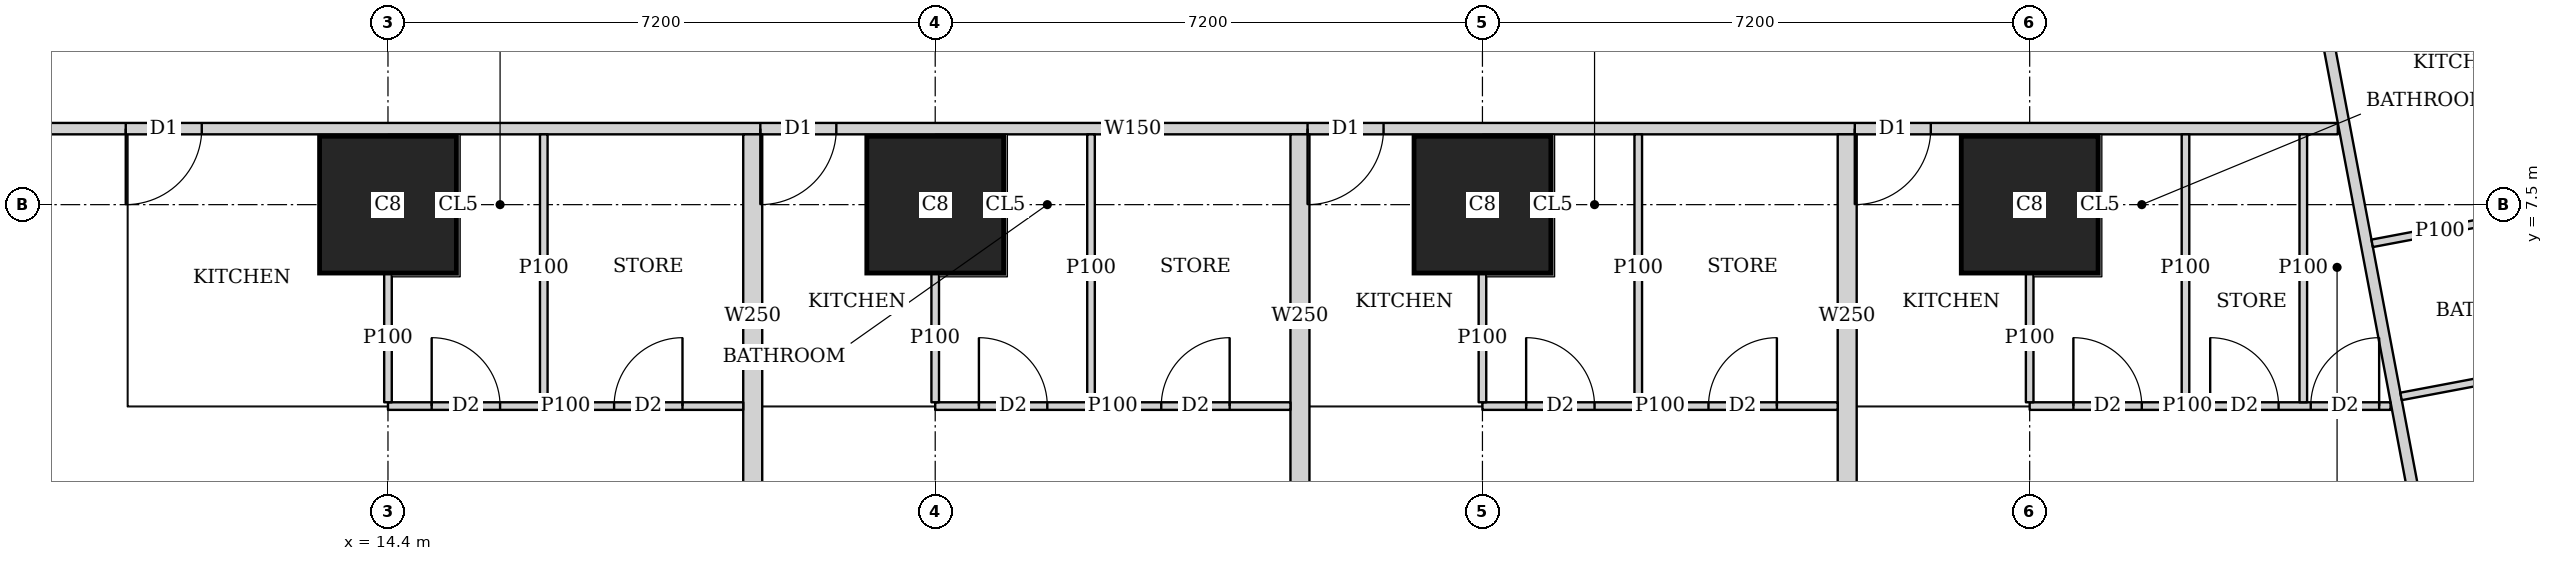
"""IFC4 building model, lengths in metres.
Left out: names, types, materials, properties, quantities, classifications, styles, units other than length and angle.
Written with IfcOpenShell. Run it as: python <this file> out.ifc"""

import sys

from ifc_helpers import new_model, si_unit, direction, frame, frame_2d, origin, origin_2d, place, context, subcontext, project, spatial, rectangle, extrude, element, fill, save


model = new_model("IFC4")
c1 = context("Model", 3, precision=1e-05, world=origin(), true_north=direction((0.0, 1.0)))
c2 = subcontext(c1, "Body", "Model", "MODEL_VIEW")
j1 = project(units=[si_unit("LENGTHUNIT", "METRE"), si_unit("PLANEANGLEUNIT", "RADIAN")], contexts=[c1])
p1 = place(None, origin())
s1 = spatial("IfcSite", under=j1, at=p1, CompositionType="ELEMENT")
p2 = place(p1, origin())
s2 = spatial("IfcBuilding", under=s1, at=p2, CompositionType="ELEMENT")
p3 = place(p2, frame((0.0, 0.0, 68.75)))
s3 = spatial("IfcBuildingStorey", under=s2, at=p3, CompositionType="ELEMENT", Elevation=68.75)
for number, where, z_axis, x_axis in (
    (1, (14.4, 7.5, 0.0), (0.0, 0.0, 1.0), (1.0, 0.0, 0.0)),
    (2, (21.6, 7.5, 0.0), (0.0, 0.0, 1.0), (1.0, 0.0, 0.0)),
    (3, (28.8, 7.5, 0.0), (0.0, 0.0, 1.0), (1.0, 0.0, 0.0)),
    (4, (36.0, 7.5, 0.0), (0.0, 0.0, 1.0), (1.0, 0.0, 0.0)),
):
    element("IfcColumn", number, at=place(p3, frame(where, z_axis=z_axis, x_axis=x_axis)), inside=s3, PredefinedType="COLUMN", context=c2, shape_type="SweptSolid", body=[
        extrude(rectangle(XDim=1.8, YDim=1.8, at=origin_2d()), origin(), (0.0, 0.0, 1.0), 3.75),
    ])
p4 = place(p3, frame((40.054, 8.5, 0.0), z_axis=(0.0, 0.0, 1.0), x_axis=(-1.0, 0.0, 0.0)))
e5 = element("IfcWall", 5, at=p4, inside=s3, PredefinedType="SOLIDWALL", context=c2, shape_type="SweptSolid", body=[
    extrude(rectangle(XDim=31.704, YDim=0.15, at=frame_2d((15.852, 0.0))), origin(), (0.0, 0.0, 1.0), 3.45),
])
p5 = place(p4, frame((28.104, 0.0, 0.0)))
e6 = element("IfcOpeningElement", 6, at=p5, cuts=e5, PredefinedType="OPENING", context=c2, shape_type="SweptSolid", body=[
    extrude(rectangle(XDim=1.0, YDim=2.1, at=frame_2d((0.5, 1.05))), frame((0.0, 0.085, 0.0), z_axis=(0.0, -1.0, 0.0), x_axis=(1.0, 0.0, 0.0)), (0.0, 0.0, 1.0), 0.17),
])
p6 = place(p4, frame((19.755, 0.0, 0.0)))
e7 = element("IfcOpeningElement", 7, at=p6, cuts=e5, PredefinedType="OPENING", context=c2, shape_type="SweptSolid", body=[
    extrude(rectangle(XDim=1.0, YDim=2.1, at=frame_2d((0.5, 1.05))), frame((0.0, 0.085, 0.0), z_axis=(0.0, -1.0, 0.0), x_axis=(1.0, 0.0, 0.0)), (0.0, 0.0, 1.0), 0.17),
])
p7 = place(p4, frame((12.555, 0.0, 0.0)))
e8 = element("IfcOpeningElement", 8, at=p7, cuts=e5, PredefinedType="OPENING", context=c2, shape_type="SweptSolid", body=[
    extrude(rectangle(XDim=1.0, YDim=2.1, at=frame_2d((0.5, 1.05))), frame((0.0, 0.085, 0.0), z_axis=(0.0, -1.0, 0.0), x_axis=(1.0, 0.0, 0.0)), (0.0, 0.0, 1.0), 0.17),
])
p8 = place(p4, frame((5.355, 0.0, 0.0)))
e9 = element("IfcOpeningElement", 9, at=p8, cuts=e5, PredefinedType="OPENING", context=c2, shape_type="SweptSolid", body=[
    extrude(rectangle(XDim=1.0, YDim=2.1, at=frame_2d((0.5, 1.05))), frame((0.0, 0.085, 0.0), z_axis=(0.0, -1.0, 0.0), x_axis=(1.0, 0.0, 0.0)), (0.0, 0.0, 1.0), 0.17),
])
p9 = place(p3, frame((33.68, 42.723, 0.0), z_axis=(0.0, 0.0, 1.0), x_axis=(0.185624129307, -0.98262082342, 0.0)))
e10 = element("IfcWall", 10, at=p9, inside=s3, PredefinedType="SOLIDWALL", context=c2, shape_type="SweptSolid", body=[
    extrude(rectangle(XDim=41.051, YDim=0.15, at=frame_2d((20.526, 0.0))), origin(), (0.0, 0.0, 1.0), 2.45),
])
p10 = place(p9, frame((13.577, 0.0, 0.0)))
e11 = element("IfcOpeningElement", 11, at=p10, cuts=e10, PredefinedType="OPENING", context=c2, shape_type="SweptSolid", body=[
    extrude(rectangle(XDim=1.0, YDim=2.1, at=frame_2d((0.5, 1.05))), frame((0.0, 0.085, 0.0), z_axis=(0.0, -1.0, 0.0), x_axis=(1.0, 0.0, 0.0)), (0.0, 0.0, 1.0), 0.17),
])
p11 = place(p9, frame((17.394, 0.0, 0.0)))
e12 = element("IfcOpeningElement", 12, at=p11, cuts=e10, PredefinedType="OPENING", context=c2, shape_type="SweptSolid", body=[
    extrude(rectangle(XDim=1.0, YDim=2.1, at=frame_2d((0.5, 1.05))), frame((0.0, 0.085, 0.0), z_axis=(0.0, -1.0, 0.0), x_axis=(1.0, 0.0, 0.0)), (0.0, 0.0, 1.0), 0.17),
])
p12 = place(p9, frame((26.758, 0.0, 0.0)))
e13 = element("IfcOpeningElement", 13, at=p12, cuts=e10, PredefinedType="OPENING", context=c2, shape_type="SweptSolid", body=[
    extrude(rectangle(XDim=1.0, YDim=2.1, at=frame_2d((0.5, 1.05))), frame((0.0, 0.085, 0.0), z_axis=(0.0, -1.0, 0.0), x_axis=(1.0, 0.0, 0.0)), (0.0, 0.0, 1.0), 0.17),
])
p13 = place(p9, frame((32.193, 0.0, 0.0)))
e14 = element("IfcOpeningElement", 14, at=p13, cuts=e10, PredefinedType="OPENING", context=c2, shape_type="SweptSolid", body=[
    extrude(rectangle(XDim=1.0, YDim=2.1, at=frame_2d((0.5, 1.05))), frame((0.0, 0.085, 0.0), z_axis=(0.0, -1.0, 0.0), x_axis=(1.0, 0.0, 0.0)), (0.0, 0.0, 1.0), 0.17),
])
p14 = place(p3, frame((19.074, 4.85, 0.0), z_axis=(0.0, 0.0, 1.0), x_axis=(-1.0, 0.0, 0.0)))
e15 = element("IfcWall", 15, at=p14, inside=s3, PredefinedType="PARTITIONING", context=c2, shape_type="SweptSolid", body=[
    extrude(rectangle(XDim=4.674, YDim=0.1, at=frame_2d((2.337, 0.0))), origin(), (0.0, 0.0, 1.0), 3.45),
])
p15 = place(p14, frame((3.199, 0.0, 0.0)))
e16 = element("IfcOpeningElement", 16, at=p15, cuts=e15, PredefinedType="OPENING", context=c2, shape_type="SweptSolid", body=[
    extrude(rectangle(XDim=0.9, YDim=2.1, at=frame_2d((0.45, 1.05))), frame((0.0, 0.06, 0.0), z_axis=(0.0, -1.0, 0.0), x_axis=(1.0, 0.0, 0.0)), (0.0, 0.0, 1.0), 0.12),
])
p16 = place(p14, frame((0.799, 0.0, 0.0)))
e17 = element("IfcOpeningElement", 17, at=p16, cuts=e15, PredefinedType="OPENING", context=c2, shape_type="SweptSolid", body=[
    extrude(rectangle(XDim=0.9, YDim=2.1, at=frame_2d((0.45, 1.05))), frame((0.0, 0.06, 0.0), z_axis=(0.0, -1.0, 0.0), x_axis=(1.0, 0.0, 0.0)), (0.0, 0.0, 1.0), 0.12),
])
p17 = place(p3, frame((14.4, 4.9, 0.0), z_axis=(0.0, 0.0, 1.0), x_axis=(0.0, 1.0, 0.0)))
e18 = element("IfcWall", 18, at=p17, inside=s3, PredefinedType="PARTITIONING", context=c2, shape_type="SweptSolid", body=[
    extrude(rectangle(XDim=1.699, YDim=0.1, at=frame_2d((0.85, 0.0))), origin(), (0.0, 0.0, 1.0), 3.45),
])
p18 = place(p3, frame((16.45, 4.9, 0.0), z_axis=(0.0, 0.0, 1.0), x_axis=(0.0, 1.0, 0.0)))
e19 = element("IfcWall", 19, at=p18, inside=s3, PredefinedType="PARTITIONING", context=c2, shape_type="SweptSolid", body=[
    extrude(rectangle(XDim=3.525, YDim=0.1, at=frame_2d((1.763, 0.0))), origin(), (0.0, 0.0, 1.0), 3.45),
])
p19 = place(p3, frame((26.274, 4.85, 0.0), z_axis=(0.0, 0.0, 1.0), x_axis=(-1.0, 0.0, 0.0)))
e20 = element("IfcWall", 20, at=p19, inside=s3, PredefinedType="PARTITIONING", context=c2, shape_type="SweptSolid", body=[
    extrude(rectangle(XDim=4.674, YDim=0.1, at=frame_2d((2.337, 0.0))), origin(), (0.0, 0.0, 1.0), 3.45),
])
p20 = place(p19, frame((3.199, 0.0, 0.0)))
e21 = element("IfcOpeningElement", 21, at=p20, cuts=e20, PredefinedType="OPENING", context=c2, shape_type="SweptSolid", body=[
    extrude(rectangle(XDim=0.9, YDim=2.1, at=frame_2d((0.45, 1.05))), frame((0.0, 0.06, 0.0), z_axis=(0.0, -1.0, 0.0), x_axis=(1.0, 0.0, 0.0)), (0.0, 0.0, 1.0), 0.12),
])
p21 = place(p19, frame((0.8, 0.0, 0.0)))
e22 = element("IfcOpeningElement", 22, at=p21, cuts=e20, PredefinedType="OPENING", context=c2, shape_type="SweptSolid", body=[
    extrude(rectangle(XDim=0.9, YDim=2.1, at=frame_2d((0.45, 1.05))), frame((0.0, 0.06, 0.0), z_axis=(0.0, -1.0, 0.0), x_axis=(1.0, 0.0, 0.0)), (0.0, 0.0, 1.0), 0.12),
])
p22 = place(p3, frame((21.6, 4.9, 0.0), z_axis=(0.0, 0.0, 1.0), x_axis=(0.0, 1.0, 0.0)))
e23 = element("IfcWall", 23, at=p22, inside=s3, PredefinedType="PARTITIONING", context=c2, shape_type="SweptSolid", body=[
    extrude(rectangle(XDim=1.699, YDim=0.1, at=frame_2d((0.85, 0.0))), origin(), (0.0, 0.0, 1.0), 3.45),
])
p23 = place(p3, frame((23.65, 4.9, 0.0), z_axis=(0.0, 0.0, 1.0), x_axis=(0.0, 1.0, 0.0)))
e24 = element("IfcWall", 24, at=p23, inside=s3, PredefinedType="PARTITIONING", context=c2, shape_type="SweptSolid", body=[
    extrude(rectangle(XDim=3.525, YDim=0.1, at=frame_2d((1.763, 0.0))), origin(), (0.0, 0.0, 1.0), 3.45),
])
p24 = place(p3, frame((19.199, 3.65, 0.0), z_axis=(0.0, 0.0, 1.0), x_axis=(0.0, 1.0, 0.0)))
e25 = element("IfcWall", 25, at=p24, inside=s3, PredefinedType="SOLIDWALL", context=c2, shape_type="SweptSolid", body=[
    extrude(rectangle(XDim=4.775, YDim=0.25, at=frame_2d((2.388, 0.0))), origin(), (0.0, 0.0, 1.0), 3.45),
])
p25 = place(p3, frame((33.474, 4.85, 0.0), z_axis=(0.0, 0.0, 1.0), x_axis=(-1.0, 0.0, 0.0)))
e26 = element("IfcWall", 26, at=p25, inside=s3, PredefinedType="PARTITIONING", context=c2, shape_type="SweptSolid", body=[
    extrude(rectangle(XDim=4.674, YDim=0.1, at=frame_2d((2.337, 0.0))), origin(), (0.0, 0.0, 1.0), 3.45),
])
p26 = place(p25, frame((3.199, 0.0, 0.0)))
e27 = element("IfcOpeningElement", 27, at=p26, cuts=e26, PredefinedType="OPENING", context=c2, shape_type="SweptSolid", body=[
    extrude(rectangle(XDim=0.9, YDim=2.1, at=frame_2d((0.45, 1.05))), frame((0.0, 0.06, 0.0), z_axis=(0.0, -1.0, 0.0), x_axis=(1.0, 0.0, 0.0)), (0.0, 0.0, 1.0), 0.12),
])
p27 = place(p25, frame((0.8, 0.0, 0.0)))
e28 = element("IfcOpeningElement", 28, at=p27, cuts=e26, PredefinedType="OPENING", context=c2, shape_type="SweptSolid", body=[
    extrude(rectangle(XDim=0.9, YDim=2.1, at=frame_2d((0.45, 1.05))), frame((0.0, 0.06, 0.0), z_axis=(0.0, -1.0, 0.0), x_axis=(1.0, 0.0, 0.0)), (0.0, 0.0, 1.0), 0.12),
])
p28 = place(p3, frame((28.8, 4.9, 0.0), z_axis=(0.0, 0.0, 1.0), x_axis=(0.0, 1.0, 0.0)))
e29 = element("IfcWall", 29, at=p28, inside=s3, PredefinedType="PARTITIONING", context=c2, shape_type="SweptSolid", body=[
    extrude(rectangle(XDim=1.699, YDim=0.1, at=frame_2d((0.85, 0.0))), origin(), (0.0, 0.0, 1.0), 3.45),
])
p29 = place(p3, frame((30.85, 4.9, 0.0), z_axis=(0.0, 0.0, 1.0), x_axis=(0.0, 1.0, 0.0)))
e30 = element("IfcWall", 30, at=p29, inside=s3, PredefinedType="PARTITIONING", context=c2, shape_type="SweptSolid", body=[
    extrude(rectangle(XDim=3.525, YDim=0.1, at=frame_2d((1.763, 0.0))), origin(), (0.0, 0.0, 1.0), 3.45),
])
p30 = place(p3, frame((26.399, 3.65, 0.0), z_axis=(0.0, 0.0, 1.0), x_axis=(0.0, 1.0, 0.0)))
e31 = element("IfcWall", 31, at=p30, inside=s3, PredefinedType="SOLIDWALL", context=c2, shape_type="SweptSolid", body=[
    extrude(rectangle(XDim=4.775, YDim=0.25, at=frame_2d((2.388, 0.0))), origin(), (0.0, 0.0, 1.0), 3.45),
])
p31 = place(p3, frame((40.748, 4.85, 0.0), z_axis=(0.0, 0.0, 1.0), x_axis=(-1.0, 0.0, 0.0)))
e32 = element("IfcWall", 32, at=p31, inside=s3, PredefinedType="PARTITIONING", context=c2, shape_type="SweptSolid", body=[
    extrude(rectangle(XDim=4.748, YDim=0.1, at=frame_2d((2.374, 0.0))), origin(), (0.0, 0.0, 1.0), 3.45),
])
p32 = place(p31, frame((3.273, 0.0, 0.0)))
e33 = element("IfcOpeningElement", 33, at=p32, cuts=e32, PredefinedType="OPENING", context=c2, shape_type="SweptSolid", body=[
    extrude(rectangle(XDim=0.9, YDim=2.1, at=frame_2d((0.45, 1.05))), frame((0.0, 0.06, 0.0), z_axis=(0.0, -1.0, 0.0), x_axis=(1.0, 0.0, 0.0)), (0.0, 0.0, 1.0), 0.12),
])
p33 = place(p31, frame((0.15, 0.0, 0.0)))
e34 = element("IfcOpeningElement", 34, at=p33, cuts=e32, PredefinedType="OPENING", context=c2, shape_type="SweptSolid", body=[
    extrude(rectangle(XDim=0.9, YDim=2.1, at=frame_2d((0.45, 1.05))), frame((0.0, 0.06, 0.0), z_axis=(0.0, -1.0, 0.0), x_axis=(1.0, 0.0, 0.0)), (0.0, 0.0, 1.0), 0.12),
])
p34 = place(p31, frame((1.473, 0.0, 0.0)))
e35 = element("IfcOpeningElement", 35, at=p34, cuts=e32, PredefinedType="OPENING", context=c2, shape_type="SweptSolid", body=[
    extrude(rectangle(XDim=0.9, YDim=2.1, at=frame_2d((0.45, 1.05))), frame((0.0, 0.06, 0.0), z_axis=(0.0, -1.0, 0.0), x_axis=(1.0, 0.0, 0.0)), (0.0, 0.0, 1.0), 0.12),
])
p35 = place(p3, frame((36.0, 4.9, 0.0), z_axis=(0.0, 0.0, 1.0), x_axis=(0.0, 1.0, 0.0)))
e36 = element("IfcWall", 36, at=p35, inside=s3, PredefinedType="PARTITIONING", context=c2, shape_type="SweptSolid", body=[
    extrude(rectangle(XDim=1.699, YDim=0.1, at=frame_2d((0.85, 0.0))), origin(), (0.0, 0.0, 1.0), 3.45),
])
for number, where, z_axis, x_axis in (
    (37, (39.6, 4.9, 0.0), (0.0, 0.0, 1.0), (0.0, 1.0, 0.0)),
    (38, (38.05, 4.9, 0.0), (0.0, 0.0, 1.0), (0.0, 1.0, 0.0)),
):
    element("IfcWall", number, at=place(p3, frame(where, z_axis=z_axis, x_axis=x_axis)), inside=s3, PredefinedType="PARTITIONING", context=c2, shape_type="SweptSolid", body=[
        extrude(rectangle(XDim=3.525, YDim=0.1, at=frame_2d((1.763, 0.0))), origin(), (0.0, 0.0, 1.0), 3.45),
    ])
p36 = place(p3, frame((33.599, 3.65, 0.0), z_axis=(0.0, 0.0, 1.0), x_axis=(0.0, 1.0, 0.0)))
e39 = element("IfcWall", 39, at=p36, inside=s3, PredefinedType="SOLIDWALL", context=c2, shape_type="SweptSolid", body=[
    extrude(rectangle(XDim=4.775, YDim=0.25, at=frame_2d((2.388, 0.0))), origin(), (0.0, 0.0, 1.0), 3.45),
])
p37 = place(p3, frame((42.29, 7.328, 0.0), z_axis=(0.0, 0.0, 1.0), x_axis=(-0.98262927905, -0.185579362952, 0.0)))
e40 = element("IfcWall", 40, at=p37, inside=s3, PredefinedType="PARTITIONING", context=c2, shape_type="SweptSolid", body=[
    extrude(rectangle(XDim=1.815, YDim=0.1, at=frame_2d((0.908, 0.0))), origin(), (0.0, 0.0, 1.0), 3.45),
])
p38 = place(p3, frame((44.349, 5.631, 0.0), z_axis=(0.0, 0.0, 1.0), x_axis=(-0.982629014545, -0.18558076348, 0.0)))
e41 = element("IfcWall", 41, at=p38, inside=s3, PredefinedType="PARTITIONING", context=c2, shape_type="SweptSolid", body=[
    extrude(rectangle(XDim=3.524, YDim=0.1, at=frame_2d((1.762, 0.0))), origin(), (0.0, 0.0, 1.0), 3.45),
])
p39 = place(p15, origin())
e42 = element("IfcDoor", 42, at=p39, inside=s3, OperationType="SINGLE_SWING_LEFT", PredefinedType="DOOR", context=c2, shape_type="SweptSolid", body=[
    extrude(rectangle(XDim=0.9, YDim=2.1, at=frame_2d((0.45, 1.05))), frame((0.0, 0.025, 0.0), z_axis=(0.0, -1.0, 0.0), x_axis=(1.0, 0.0, 0.0)), (0.0, 0.0, 1.0), 0.05),
])
fill(e16, e42)
p40 = place(p16, origin())
e43 = element("IfcDoor", 43, at=p40, inside=s3, OperationType="SINGLE_SWING_RIGHT", PredefinedType="DOOR", context=c2, shape_type="SweptSolid", body=[
    extrude(rectangle(XDim=0.9, YDim=2.1, at=frame_2d((0.45, 1.05))), frame((0.0, 0.025, 0.0), z_axis=(0.0, -1.0, 0.0), x_axis=(1.0, 0.0, 0.0)), (0.0, 0.0, 1.0), 0.05),
])
fill(e17, e43)
p41 = place(p5, origin())
e44 = element("IfcDoor", 44, at=p41, inside=s3, OperationType="SINGLE_SWING_RIGHT", PredefinedType="DOOR", context=c2, shape_type="SweptSolid", body=[
    extrude(rectangle(XDim=1.0, YDim=2.1, at=frame_2d((0.5, 1.05))), frame((0.0, 0.025, 0.0), z_axis=(0.0, -1.0, 0.0), x_axis=(1.0, 0.0, 0.0)), (0.0, 0.0, 1.0), 0.05),
])
fill(e6, e44)
p42 = place(p20, origin())
e45 = element("IfcDoor", 45, at=p42, inside=s3, OperationType="SINGLE_SWING_LEFT", PredefinedType="DOOR", context=c2, shape_type="SweptSolid", body=[
    extrude(rectangle(XDim=0.9, YDim=2.1, at=frame_2d((0.45, 1.05))), frame((0.0, 0.025, 0.0), z_axis=(0.0, -1.0, 0.0), x_axis=(1.0, 0.0, 0.0)), (0.0, 0.0, 1.0), 0.05),
])
fill(e21, e45)
p43 = place(p21, origin())
e46 = element("IfcDoor", 46, at=p43, inside=s3, OperationType="SINGLE_SWING_RIGHT", PredefinedType="DOOR", context=c2, shape_type="SweptSolid", body=[
    extrude(rectangle(XDim=0.9, YDim=2.1, at=frame_2d((0.45, 1.05))), frame((0.0, 0.025, 0.0), z_axis=(0.0, -1.0, 0.0), x_axis=(1.0, 0.0, 0.0)), (0.0, 0.0, 1.0), 0.05),
])
fill(e22, e46)
p44 = place(p6, origin())
e47 = element("IfcDoor", 47, at=p44, inside=s3, OperationType="SINGLE_SWING_RIGHT", PredefinedType="DOOR", context=c2, shape_type="SweptSolid", body=[
    extrude(rectangle(XDim=1.0, YDim=2.1, at=frame_2d((0.5, 1.05))), frame((0.0, 0.025, 0.0), z_axis=(0.0, -1.0, 0.0), x_axis=(1.0, 0.0, 0.0)), (0.0, 0.0, 1.0), 0.05),
])
fill(e7, e47)
p45 = place(p26, origin())
e48 = element("IfcDoor", 48, at=p45, inside=s3, OperationType="SINGLE_SWING_LEFT", PredefinedType="DOOR", context=c2, shape_type="SweptSolid", body=[
    extrude(rectangle(XDim=0.9, YDim=2.1, at=frame_2d((0.45, 1.05))), frame((0.0, 0.025, 0.0), z_axis=(0.0, -1.0, 0.0), x_axis=(1.0, 0.0, 0.0)), (0.0, 0.0, 1.0), 0.05),
])
fill(e27, e48)
p46 = place(p27, origin())
e49 = element("IfcDoor", 49, at=p46, inside=s3, OperationType="SINGLE_SWING_RIGHT", PredefinedType="DOOR", context=c2, shape_type="SweptSolid", body=[
    extrude(rectangle(XDim=0.9, YDim=2.1, at=frame_2d((0.45, 1.05))), frame((0.0, 0.025, 0.0), z_axis=(0.0, -1.0, 0.0), x_axis=(1.0, 0.0, 0.0)), (0.0, 0.0, 1.0), 0.05),
])
fill(e28, e49)
p47 = place(p7, origin())
e50 = element("IfcDoor", 50, at=p47, inside=s3, OperationType="SINGLE_SWING_RIGHT", PredefinedType="DOOR", context=c2, shape_type="SweptSolid", body=[
    extrude(rectangle(XDim=1.0, YDim=2.1, at=frame_2d((0.5, 1.05))), frame((0.0, 0.025, 0.0), z_axis=(0.0, -1.0, 0.0), x_axis=(1.0, 0.0, 0.0)), (0.0, 0.0, 1.0), 0.05),
])
fill(e8, e50)
p48 = place(p32, origin())
e51 = element("IfcDoor", 51, at=p48, inside=s3, OperationType="SINGLE_SWING_LEFT", PredefinedType="DOOR", context=c2, shape_type="SweptSolid", body=[
    extrude(rectangle(XDim=0.9, YDim=2.1, at=frame_2d((0.45, 1.05))), frame((0.0, 0.025, 0.0), z_axis=(0.0, -1.0, 0.0), x_axis=(1.0, 0.0, 0.0)), (0.0, 0.0, 1.0), 0.05),
])
fill(e33, e51)
p49 = place(p33, origin())
e52 = element("IfcDoor", 52, at=p49, inside=s3, OperationType="SINGLE_SWING_RIGHT", PredefinedType="DOOR", context=c2, shape_type="SweptSolid", body=[
    extrude(rectangle(XDim=0.9, YDim=2.1, at=frame_2d((0.45, 1.05))), frame((0.0, 0.025, 0.0), z_axis=(0.0, -1.0, 0.0), x_axis=(1.0, 0.0, 0.0)), (0.0, 0.0, 1.0), 0.05),
])
fill(e34, e52)
p50 = place(p34, origin())
e53 = element("IfcDoor", 53, at=p50, inside=s3, OperationType="SINGLE_SWING_LEFT", PredefinedType="DOOR", context=c2, shape_type="SweptSolid", body=[
    extrude(rectangle(XDim=0.9, YDim=2.1, at=frame_2d((0.45, 1.05))), frame((0.0, 0.025, 0.0), z_axis=(0.0, -1.0, 0.0), x_axis=(1.0, 0.0, 0.0)), (0.0, 0.0, 1.0), 0.05),
])
fill(e35, e53)
p51 = place(p8, origin())
e54 = element("IfcDoor", 54, at=p51, inside=s3, OperationType="SINGLE_SWING_RIGHT", PredefinedType="DOOR", context=c2, shape_type="SweptSolid", body=[
    extrude(rectangle(XDim=1.0, YDim=2.1, at=frame_2d((0.5, 1.05))), frame((0.0, 0.025, 0.0), z_axis=(0.0, -1.0, 0.0), x_axis=(1.0, 0.0, 0.0)), (0.0, 0.0, 1.0), 0.05),
])
fill(e9, e54)
save(model, sys.argv[1])
